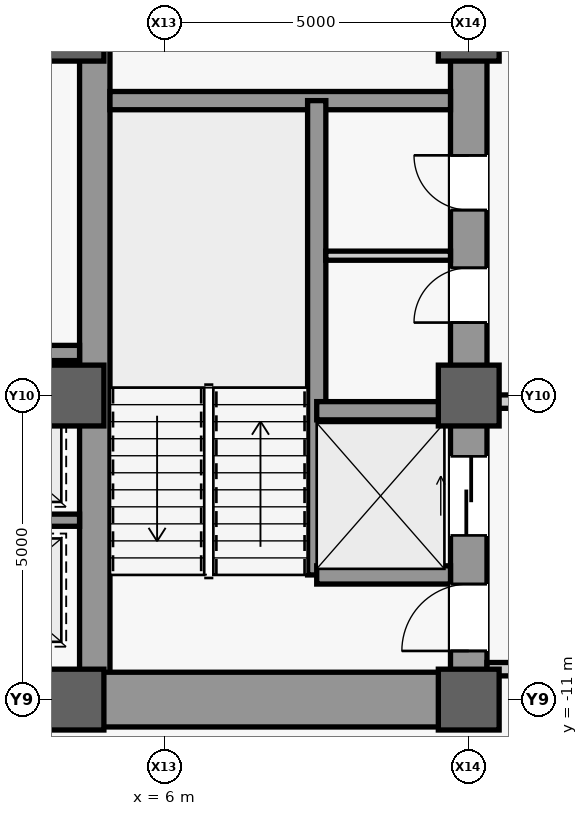
"""IFC4 building model, lengths in metres.
Left out: names, types, materials, properties, quantities, classifications, styles, units other than length and angle.
Written with IfcOpenShell. Run it as: python <this file> out.ifc"""

import sys

from ifc_helpers import new_model, si_unit, direction, frame, frame_2d, origin, origin_2d, place, context, subcontext, project, spatial, rectangle, extrude, source, transform, mapped, element, fill, save


model = new_model("IFC4")
c1 = context("Model", 3, precision=1e-05, world=origin(), true_north=direction((0.0, 1.0)))
c2 = subcontext(c1, "Body", "Model", "MODEL_VIEW")
j1 = project(units=[si_unit("LENGTHUNIT", "METRE"), si_unit("PLANEANGLEUNIT", "RADIAN")], contexts=[c1])
p1 = place(None, origin())
s1 = spatial("IfcSite", under=j1, at=p1, CompositionType="ELEMENT")
p2 = place(p1, origin())
s2 = spatial("IfcBuilding", under=s1, at=p2, CompositionType="ELEMENT")
p3 = place(p2, frame((0.0, 0.0, 32.6)))
s3 = spatial("IfcBuildingStorey", under=s2, at=p3, CompositionType="ELEMENT", Elevation=32.6)
m1 = source(origin(), c2, "Body", "SweptSolid", [
    extrude(rectangle(XDim=22.0, YDim=0.6, at=frame_2d((11.0, 0.0))), origin(), (0.0, 0.0, 1.0), 3.94),
])
p4 = place(p3, frame((11.0, -11.0, 0.0), z_axis=(0.0, 0.0, 1.0), x_axis=(0.0, 1.0, 0.0)))
e1 = element("IfcWall", 1, at=p4, inside=s3, PredefinedType="SHEAR", context=c2, shape_type="MappedRepresentation", body=[
    mapped(m1, transform((0.0, 0.0, 0.0), scale=1.0)),
])
m2 = source(origin(), c2, "Body", "SweptSolid", [
    extrude(rectangle(XDim=1.1, YDim=2.2, at=frame_2d((0.55, 1.1))), frame((0.0, 0.31, 0.0), z_axis=(0.0, -1.0, 0.0), x_axis=(1.0, 0.0, 0.0)), (0.0, 0.0, 1.0), 0.62),
])
p5 = place(p4, frame((0.8, 0.0, 0.0)))
e2 = element("IfcOpeningElement", 2, at=p5, cuts=e1, PredefinedType="OPENING", context=c2, shape_type="MappedRepresentation", body=[
    mapped(m2, transform((0.0, 0.0, 0.0), scale=1.0)),
])
m3 = source(origin(), c2, "Body", "SweptSolid", [
    extrude(rectangle(XDim=0.9, YDim=2.15, at=frame_2d((0.45, 1.075))), frame((0.0, 0.31, 0.0), z_axis=(0.0, -1.0, 0.0), x_axis=(1.0, 0.0, 0.0)), (0.0, 0.0, 1.0), 0.62),
])
p6 = place(p4, frame((6.2, 0.0, 0.0)))
e3 = element("IfcOpeningElement", 3, at=p6, cuts=e1, PredefinedType="OPENING", context=c2, shape_type="MappedRepresentation", body=[
    mapped(m3, transform((0.0, 0.0, 0.0), scale=1.0)),
])
p7 = place(p4, frame((8.05, 0.0, 0.0)))
e4 = element("IfcOpeningElement", 4, at=p7, cuts=e1, PredefinedType="OPENING", context=c2, shape_type="MappedRepresentation", body=[
    mapped(m3, transform((0.0, 0.0, 0.0), scale=1.0)),
])
m4 = source(origin(), c2, "Body", "SweptSolid", [
    extrude(rectangle(XDim=1.3, YDim=2.3, at=frame_2d((0.65, 1.15))), frame((0.0, 0.31, 0.0), z_axis=(0.0, -1.0, 0.0), x_axis=(1.0, 0.0, 0.0)), (0.0, 0.0, 1.0), 0.62),
])
p8 = place(p4, frame((2.7, 0.0, 0.0)))
e5 = element("IfcOpeningElement", 5, at=p8, cuts=e1, PredefinedType="OPENING", context=c2, shape_type="MappedRepresentation", body=[
    mapped(m4, transform((0.0, 0.0, 0.0), scale=1.0)),
])
p9 = place(p4, frame((13.35, 0.0, 0.0)))
e6 = element("IfcOpeningElement", 6, at=p9, cuts=e1, PredefinedType="OPENING", context=c2, shape_type="MappedRepresentation", body=[
    mapped(m4, transform((0.0, 0.0, 0.0), scale=1.0)),
])
m5 = source(origin(), c2, "Body", "SweptSolid", [
    extrude(rectangle(XDim=21.4, YDim=0.5, at=frame_2d((10.7, 0.0))), origin(), (0.0, 0.0, 1.0), 3.94),
])
p10 = place(p3, frame((4.85, -10.7, 0.0), z_axis=(0.0, 0.0, 1.0), x_axis=(0.0, 1.0, 0.0)))
e7 = element("IfcWall", 7, at=p10, inside=s3, PredefinedType="SHEAR", context=c2, shape_type="MappedRepresentation", body=[
    mapped(m5, transform((0.0, 0.0, 0.0), scale=1.0)),
])
m6 = source(origin(), c2, "Body", "SweptSolid", [
    extrude(rectangle(XDim=5.85, YDim=0.9, at=frame_2d((2.925, 0.0))), origin(), (0.0, 0.0, 1.0), 3.94),
])
p11 = place(p3, frame((4.85, -11.0, 0.0), z_axis=(0.0, 0.0, 1.0), x_axis=(1.0, 0.0, 0.0)))
e8 = element("IfcWall", 8, at=p11, inside=s3, PredefinedType="SHEAR", context=c2, shape_type="MappedRepresentation", body=[
    mapped(m6, transform((0.0, 0.0, 0.0), scale=1.0)),
])
m7 = source(origin(), c2, "Body", "SweptSolid", [
    extrude(rectangle(XDim=5.6, YDim=0.3, at=frame_2d((2.8, 0.0))), origin(), (0.0, 0.0, 1.0), 3.94),
])
p12 = place(p3, frame((5.1, -1.15, 0.0), z_axis=(0.0, 0.0, 1.0), x_axis=(1.0, 0.0, 0.0)))
e9 = element("IfcWall", 9, at=p12, inside=s3, PredefinedType="SHEAR", context=c2, shape_type="MappedRepresentation", body=[
    mapped(m7, transform((0.0, 0.0, 0.0), scale=1.0)),
])
m8 = source(origin(), c2, "Body", "SweptSolid", [
    extrude(rectangle(XDim=9.2, YDim=0.5, at=frame_2d((4.6, 0.0))), origin(), (0.0, 0.0, 1.0), 3.94),
])
p13 = place(p3, frame((-4.6, -11.0, 0.0), z_axis=(0.0, 0.0, 1.0), x_axis=(1.0, 0.0, 0.0)))
e10 = element("IfcWall", 10, at=p13, inside=s3, PredefinedType="SHEAR", context=c2, shape_type="MappedRepresentation", body=[
    mapped(m8, transform((0.0, 0.0, 0.0), scale=1.0)),
])
m9 = source(origin(), c2, "Body", "SweptSolid", [
    extrude(rectangle(XDim=1.8, YDim=2.25, at=frame_2d((0.9, 1.125))), frame((0.0, 0.26, 0.0), z_axis=(0.0, -1.0, 0.0), x_axis=(1.0, 0.0, 0.0)), (0.0, 0.0, 1.0), 0.52),
])
p14 = place(p13, frame((3.7, 0.0, 0.0)))
e11 = element("IfcOpeningElement", 11, at=p14, cuts=e10, PredefinedType="OPENING", context=c2, shape_type="MappedRepresentation", body=[
    mapped(m9, transform((0.0, 0.0, 0.0), scale=1.0)),
])
m10 = source(origin(), c2, "Body", "SweptSolid", [
    extrude(rectangle(XDim=1.0, YDim=1.0, at=origin_2d()), origin(), (0.0, 0.0, 1.0), 4.2),
])
for number, where, z_axis, x_axis in (
    (12, (4.5, -11.0, 0.0), (0.0, 0.0, 1.0), (1.0, 0.0, 0.0)),
    (13, (4.5, -6.0, 0.0), (0.0, 0.0, 1.0), (1.0, 0.0, 0.0)),
    (14, (4.5, 0.0, 0.0), (0.0, 0.0, 1.0), (1.0, 0.0, 0.0)),
    (15, (11.0, -11.0, 0.0), (0.0, 0.0, 1.0), (1.0, 0.0, 0.0)),
    (16, (11.0, -6.0, 0.0), (0.0, 0.0, 1.0), (1.0, 0.0, 0.0)),
    (17, (11.0, 0.0, 0.0), (0.0, 0.0, 1.0), (1.0, 0.0, 0.0)),
):
    element("IfcColumn", number, at=place(p3, frame(where, z_axis=z_axis, x_axis=x_axis)), inside=s3, PredefinedType="COLUMN", context=c2, shape_type="MappedRepresentation", body=[
        mapped(m10, transform((0.0, 0.0, 0.0), scale=1.0)),
    ])
m11 = source(origin(), c2, "Body", "SweptSolid", [
    extrude(rectangle(XDim=7.8, YDim=0.3, at=frame_2d((3.9, 0.0))), origin(), (0.0, 0.0, 1.0), 3.94),
])
p15 = place(p3, frame((8.5, -8.95, 0.0), z_axis=(0.0, 0.0, 1.0), x_axis=(0.0, 1.0, 0.0)))
e18 = element("IfcWall", 18, at=p15, inside=s3, PredefinedType="SHEAR", context=c2, shape_type="MappedRepresentation", body=[
    mapped(m11, transform((0.0, 0.0, 0.0), scale=1.0)),
])
m12 = source(origin(), c2, "Body", "SweptSolid", [
    extrude(rectangle(XDim=2.2, YDim=0.3, at=frame_2d((1.1, 0.0))), origin(), (0.0, 0.0, 1.0), 3.94),
])
for number, where, z_axis, x_axis in (
    (19, (8.5, -8.95, 0.0), (0.0, 0.0, 1.0), (1.0, 0.0, 0.0)),
    (20, (8.5, -6.25, 0.0), (0.0, 0.0, 1.0), (1.0, 0.0, 0.0)),
):
    element("IfcWall", number, at=place(p3, frame(where, z_axis=z_axis, x_axis=x_axis)), inside=s3, PredefinedType="SHEAR", context=c2, shape_type="MappedRepresentation", body=[
        mapped(m12, transform((0.0, 0.0, 0.0), scale=1.0)),
    ])
m13 = source(origin(), c2, "Body", "SweptSolid", [
    extrude(rectangle(XDim=2.05, YDim=0.15, at=frame_2d((1.025, 0.0))), origin(), (0.0, 0.0, 1.0), 3.94),
])
p16 = place(p3, frame((8.65, -3.7, 0.0), z_axis=(0.0, 0.0, 1.0), x_axis=(1.0, 0.0, 0.0)))
e21 = element("IfcWall", 21, at=p16, inside=s3, PredefinedType="PARTITIONING", context=c2, shape_type="MappedRepresentation", body=[
    mapped(m13, transform((0.0, 0.0, 0.0), scale=1.0)),
])
m14 = source(origin(), c2, "Body", "SweptSolid", [
    extrude(rectangle(XDim=4.05, YDim=0.22, at=frame_2d((2.025, 0.0))), origin(), (0.0, 0.0, 1.0), 3.94),
])
p17 = place(p3, frame((11.3, -10.5, 0.0), z_axis=(0.0, 0.0, 1.0), x_axis=(1.0, 0.0, 0.0)))
e22 = element("IfcWall", 22, at=p17, inside=s3, PredefinedType="PARTITIONING", context=c2, shape_type="MappedRepresentation", body=[
    mapped(m14, transform((0.0, 0.0, 0.0), scale=1.0)),
])
m15 = source(origin(), c2, "Body", "SweptSolid", [
    extrude(rectangle(XDim=4.05, YDim=0.22, at=frame_2d((2.025, 0.0))), origin(), (0.0, 0.0, 1.0), 3.085),
])
p18 = place(p3, frame((11.3, -6.1, 0.0), z_axis=(0.0, 0.0, 1.0), x_axis=(1.0, 0.0, 0.0)))
e23 = element("IfcWall", 23, at=p18, inside=s3, PredefinedType="PARTITIONING", context=c2, shape_type="MappedRepresentation", body=[
    mapped(m15, transform((0.0, 0.0, 0.0), scale=1.0)),
])
m16 = source(origin(), c2, "Body", "SweptSolid", [
    extrude(rectangle(XDim=2.45, YDim=0.2, at=frame_2d((1.225, 0.0))), origin(), (0.0, 0.0, 1.0), 3.94),
])
p19 = place(p3, frame((2.15, -8.05, 0.0), z_axis=(0.0, 0.0, 1.0), x_axis=(1.0, 0.0, 0.0)))
e24 = element("IfcWall", 24, at=p19, inside=s3, PredefinedType="SHEAR", context=c2, shape_type="MappedRepresentation", body=[
    mapped(m16, transform((0.0, 0.0, 0.0), scale=1.0)),
])
m17 = source(origin(), c2, "Body", "SweptSolid", [
    extrude(rectangle(XDim=9.2, YDim=0.25, at=frame_2d((4.6, 0.0))), origin(), (0.0, 0.0, 1.0), 3.94),
])
p20 = place(p3, frame((-4.6, -5.3, 0.0), z_axis=(0.0, 0.0, 1.0), x_axis=(1.0, 0.0, 0.0)))
e25 = element("IfcWall", 25, at=p20, inside=s3, PredefinedType="SHEAR", context=c2, shape_type="MappedRepresentation", body=[
    mapped(m17, transform((0.0, 0.0, 0.0), scale=1.0)),
])
m18 = source(origin(), c2, "Body", "SweptSolid", [
    extrude(rectangle(XDim=1.05, YDim=2.2, at=frame_2d((0.525, 1.1))), frame((0.0, 0.135, 0.0), z_axis=(0.0, -1.0, 0.0), x_axis=(1.0, 0.0, 0.0)), (0.0, 0.0, 1.0), 0.27),
])
p21 = place(p20, frame((4.075, 0.0, 0.0)))
e26 = element("IfcOpeningElement", 26, at=p21, cuts=e25, PredefinedType="OPENING", context=c2, shape_type="MappedRepresentation", body=[
    mapped(m18, transform((0.0, 0.0, 0.0), scale=1.0)),
])
m19 = source(origin(), c2, "Body", "SweptSolid", [
    extrude(rectangle(XDim=1.1, YDim=2.2, at=frame_2d((0.55, 1.1))), frame((0.0, 0.025, 0.0), z_axis=(0.0, -1.0, 0.0), x_axis=(1.0, 0.0, 0.0)), (0.0, 0.0, 1.0), 0.05),
])
p22 = place(p5, origin())
e27 = element("IfcDoor", 27, at=p22, inside=s3, OperationType="SINGLE_SWING_LEFT", PredefinedType="DOOR", context=c2, shape_type="MappedRepresentation", body=[
    mapped(m19, transform((0.0, 0.0, 0.0), scale=1.0)),
])
fill(e2, e27)
m20 = source(origin(), c2, "Body", "SweptSolid", [
    extrude(rectangle(XDim=0.9, YDim=2.15, at=frame_2d((0.45, 1.075))), frame((0.0, 0.025, 0.0), z_axis=(0.0, -1.0, 0.0), x_axis=(1.0, 0.0, 0.0)), (0.0, 0.0, 1.0), 0.05),
])
p23 = place(p6, origin())
e28 = element("IfcDoor", 28, at=p23, inside=s3, OperationType="SINGLE_SWING_LEFT", PredefinedType="DOOR", context=c2, shape_type="MappedRepresentation", body=[
    mapped(m20, transform((0.0, 0.0, 0.0), scale=1.0)),
])
fill(e3, e28)
p24 = place(p7, origin())
e29 = element("IfcDoor", 29, at=p24, inside=s3, OperationType="SINGLE_SWING_RIGHT", PredefinedType="DOOR", context=c2, shape_type="MappedRepresentation", body=[
    mapped(m20, transform((0.0, 0.0, 0.0), scale=1.0)),
])
fill(e4, e29)
m21 = source(origin(), c2, "Body", "SweptSolid", [
    extrude(rectangle(XDim=1.3, YDim=2.3, at=frame_2d((0.65, 1.15))), frame((0.0, 0.025, 0.0), z_axis=(0.0, -1.0, 0.0), x_axis=(1.0, 0.0, 0.0)), (0.0, 0.0, 1.0), 0.05),
])
p25 = place(p8, origin())
e30 = element("IfcDoor", 30, at=p25, inside=s3, OperationType="SLIDING_TO_LEFT", PredefinedType="DOOR", context=c2, shape_type="MappedRepresentation", body=[
    mapped(m21, transform((0.0, 0.0, 0.0), scale=1.0)),
])
fill(e5, e30)
save(model, sys.argv[1])
